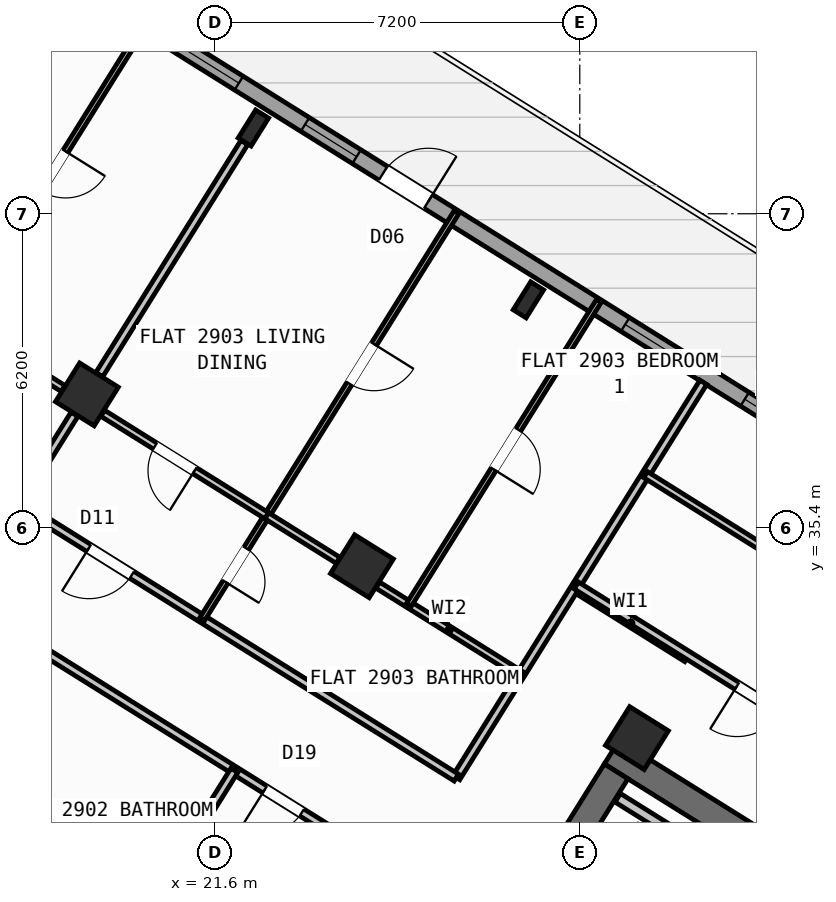
"""IFC4 building model, lengths in metres.
Left out: names, types, materials, properties, quantities, classifications, styles, units other than length and angle.
Written with IfcOpenShell. Run it as: python <this file> out.ifc"""

import sys

from ifc_helpers import new_model, si_unit, direction, frame, frame_2d, origin, origin_2d, place, context, subcontext, project, spatial, rectangle, hollow_rectangle, i_section, extrude, source, transform, mapped, element, fill, save


model = new_model("IFC4")
c1 = context("Model", 3, precision=1e-05, world=origin(), true_north=direction((0.0, 1.0)))
c2 = subcontext(c1, "Body", "Model", "MODEL_VIEW")
j1 = project(units=[si_unit("LENGTHUNIT", "METRE"), si_unit("PLANEANGLEUNIT", "RADIAN")], contexts=[c1])
p1 = place(None, origin())
s1 = spatial("IfcSite", under=j1, at=p1, CompositionType="ELEMENT")
p2 = place(p1, origin())
s2 = spatial("IfcBuilding", under=s1, at=p2, CompositionType="ELEMENT")
p3 = place(p2, frame((0.0, 0.0, 116.1)))
s3 = spatial("IfcBuildingStorey", under=s2, at=p3, CompositionType="ELEMENT", Elevation=116.1)
p4 = place(p3, frame((40.573, 24.01, 0.0), z_axis=(0.0, 0.0, 1.0), x_axis=(-0.848047359947, 0.529920442413, 0.0)))
e1 = element("IfcWall", 1, at=p4, inside=s3, PredefinedType="SHEAR", context=c2, shape_type="SweptSolid", body=[
    extrude(rectangle(XDim=13.14, YDim=0.55, at=frame_2d((6.57, 0.0))), origin(), (0.0, 0.0, 1.0), 3.35),
])
p5 = place(p3, frame((29.517, 30.594, 0.0), z_axis=(0.0, 0.0, 1.0), x_axis=(-0.529906864564, -0.848055844204, 0.0)))
e2 = element("IfcWall", 2, at=p5, inside=s3, PredefinedType="SHEAR", context=c2, shape_type="SweptSolid", body=[
    extrude(rectangle(XDim=3.575, YDim=0.55, at=frame_2d((1.788, 0.0))), origin(), (0.0, 0.0, 1.0), 3.35),
])
m1 = source(origin(), c2, "Body", "SweptSolid", [
    extrude(hollow_rectangle(XDim=0.9, YDim=0.9, WallThickness=0.036, at=origin_2d()), origin(), (0.0, 0.0, 1.0), 3.6),
])
p6 = place(p3, frame((29.928, 31.251, 0.0), z_axis=(0.0, 0.0, 1.0), x_axis=(-0.848048096156, 0.529919264233, 0.0)))
e3 = element("IfcColumn", 3, at=p6, inside=s3, PredefinedType="COLUMN", context=c2, shape_type="MappedRepresentation", body=[
    mapped(m1, transform((0.0, 0.0, 0.0), scale=1.0)),
])
m2 = source(origin(), c2, "Body", "SweptSolid", [
    extrude(i_section(OverallWidth=0.3, OverallDepth=0.65, WebThickness=0.016, FlangeThickness=0.031, at=origin_2d()), origin(), (0.0, 0.0, 1.0), 3.6),
])
p7 = place(p3, frame((27.786, 39.901, 0.0), z_axis=(0.0, 0.0, 1.0), x_axis=(-0.848048096156, 0.529919264233, 0.0)))
e4 = element("IfcColumn", 4, at=p7, inside=s3, PredefinedType="COLUMN", context=c2, shape_type="MappedRepresentation", body=[
    mapped(m2, transform((0.0, 0.0, 0.0), scale=1.0)),
])
p8 = place(p3, frame((24.5, 34.643, 0.0), z_axis=(0.0, 0.0, 1.0), x_axis=(-0.848048096156, 0.529919264233, 0.0)))
e5 = element("IfcColumn", 5, at=p8, inside=s3, PredefinedType="COLUMN", context=c2, shape_type="MappedRepresentation", body=[
    mapped(m1, transform((0.0, 0.0, 0.0), scale=1.0)),
])
p9 = place(p3, frame((22.358, 43.292, 0.0), z_axis=(0.0, 0.0, 1.0), x_axis=(-0.848048096156, 0.529919264233, 0.0)))
e6 = element("IfcColumn", 6, at=p9, inside=s3, PredefinedType="COLUMN", context=c2, shape_type="MappedRepresentation", body=[
    mapped(m2, transform((0.0, 0.0, 0.0), scale=1.0)),
])
p10 = place(p3, frame((19.073, 38.034, 0.0), z_axis=(0.0, 0.0, 1.0), x_axis=(-0.848048096156, 0.529919264233, 0.0)))
e7 = element("IfcColumn", 7, at=p10, inside=s3, PredefinedType="COLUMN", context=c2, shape_type="MappedRepresentation", body=[
    mapped(m1, transform((0.0, 0.0, 0.0), scale=1.0)),
])
p11 = place(p3, frame((17.424, 47.083, 0.0), z_axis=(0.0, 0.0, 1.0), x_axis=(0.848049927979, -0.529916332693, 0.0)))
e8 = element("IfcWall", 8, at=p11, inside=s3, PredefinedType="STANDARD", context=c2, shape_type="SweptSolid", body=[
    extrude(rectangle(XDim=29.223, YDim=0.32, at=frame_2d((14.612, 0.0))), origin(), (0.0, 0.0, 1.0), 3.35),
])
p12 = place(p11, frame((8.839, 0.0, 0.0)))
e9 = element("IfcOpeningElement", 9, at=p12, cuts=e8, PredefinedType="OPENING", context=c2, shape_type="SweptSolid", body=[
    extrude(rectangle(XDim=1.05, YDim=2.15, at=frame_2d((0.525, 1.075))), frame((0.0, 0.17, 0.0), z_axis=(0.0, -1.0, 0.0), x_axis=(1.0, 0.0, 0.0)), (0.0, 0.0, 1.0), 0.34),
])
p13 = place(p11, frame((0.719, 0.0, 0.85)))
e10 = element("IfcOpeningElement", 10, at=p13, cuts=e8, PredefinedType="OPENING", context=c2, shape_type="SweptSolid", body=[
    extrude(rectangle(XDim=1.8, YDim=1.5, at=frame_2d((0.9, 0.75))), frame((0.0, 0.17, 0.0), z_axis=(0.0, -1.0, 0.0), x_axis=(1.0, 0.0, 0.0)), (0.0, 0.0, 1.0), 0.34),
])
p14 = place(p11, frame((3.981, 0.0, 0.85)))
e11 = element("IfcOpeningElement", 11, at=p14, cuts=e8, PredefinedType="OPENING", context=c2, shape_type="SweptSolid", body=[
    extrude(rectangle(XDim=1.5, YDim=1.5, at=frame_2d((0.75, 0.75))), frame((0.0, 0.17, 0.0), z_axis=(0.0, -1.0, 0.0), x_axis=(1.0, 0.0, 0.0)), (0.0, 0.0, 1.0), 0.34),
])
p15 = place(p11, frame((7.021, 0.0, 0.95)))
e12 = element("IfcOpeningElement", 12, at=p15, cuts=e8, PredefinedType="OPENING", context=c2, shape_type="SweptSolid", body=[
    extrude(rectangle(XDim=1.2, YDim=1.4, at=frame_2d((0.6, 0.7))), frame((0.0, 0.17, 0.0), z_axis=(0.0, -1.0, 0.0), x_axis=(1.0, 0.0, 0.0)), (0.0, 0.0, 1.0), 0.34),
])
p16 = place(p11, frame((14.471, 0.0, 0.95)))
e13 = element("IfcOpeningElement", 13, at=p16, cuts=e8, PredefinedType="OPENING", context=c2, shape_type="SweptSolid", body=[
    extrude(rectangle(XDim=1.2, YDim=1.4, at=frame_2d((0.6, 0.7))), frame((0.0, 0.17, 0.0), z_axis=(0.0, -1.0, 0.0), x_axis=(1.0, 0.0, 0.0)), (0.0, 0.0, 1.0), 0.34),
])
p17 = place(p11, frame((17.254, 0.0, 1.0)))
e14 = element("IfcOpeningElement", 14, at=p17, cuts=e8, PredefinedType="OPENING", context=c2, shape_type="SweptSolid", body=[
    extrude(rectangle(XDim=0.9, YDim=1.25, at=frame_2d((0.45, 0.625))), frame((0.0, 0.17, 0.0), z_axis=(0.0, -1.0, 0.0), x_axis=(1.0, 0.0, 0.0)), (0.0, 0.0, 1.0), 0.34),
])
p18 = place(p11, frame((20.764, 0.0, 0.8)))
e15 = element("IfcOpeningElement", 15, at=p18, cuts=e8, PredefinedType="OPENING", context=c2, shape_type="SweptSolid", body=[
    extrude(rectangle(XDim=2.1, YDim=1.55, at=frame_2d((1.05, 0.775))), frame((0.0, 0.17, 0.0), z_axis=(0.0, -1.0, 0.0), x_axis=(1.0, 0.0, 0.0)), (0.0, 0.0, 1.0), 0.34),
])
p19 = place(p11, frame((25.403, 0.0, 0.8)))
e16 = element("IfcOpeningElement", 16, at=p19, cuts=e8, PredefinedType="OPENING", context=c2, shape_type="SweptSolid", body=[
    extrude(rectangle(XDim=2.1, YDim=1.55, at=frame_2d((1.05, 0.775))), frame((0.0, 0.17, 0.0), z_axis=(0.0, -1.0, 0.0), x_axis=(1.0, 0.0, 0.0)), (0.0, 0.0, 1.0), 0.34),
])
p20 = place(p3, frame((33.363, 27.69, 0.0), z_axis=(0.0, 0.0, 1.0), x_axis=(-0.848047090064, 0.529920874315, 0.0)))
e17 = element("IfcWall", 17, at=p20, inside=s3, PredefinedType="STANDARD", context=c2, shape_type="SweptSolid", body=[
    extrude(rectangle(XDim=4.498, YDim=0.2, at=frame_2d((2.249, 0.0))), origin(), (0.0, 0.0, 1.0), 3.34),
])
p21 = place(p3, frame((30.914, 32.829, 0.0), z_axis=(0.0, 0.0, 1.0), x_axis=(-0.848008813643, 0.529982124211, 0.0)))
e18 = element("IfcWall", 18, at=p21, inside=s3, PredefinedType="PARTITIONING", context=c2, shape_type="SweptSolid", body=[
    extrude(rectangle(XDim=2.61, YDim=0.16, at=frame_2d((1.305, 0.0))), origin(), (0.0, 0.0, 1.0), 3.34),
])
p22 = place(p3, frame((31.239, 38.274, 0.0), z_axis=(0.0, 0.0, 1.0), x_axis=(-0.529920220799, -0.848047498427, 0.0)))
e19 = element("IfcWall", 19, at=p22, inside=s3, PredefinedType="PARTITIONING", context=c2, shape_type="SweptSolid", body=[
    extrude(rectangle(XDim=9.2, YDim=0.16, at=frame_2d((4.6, 0.0))), origin(), (0.0, 0.0, 1.0), 3.34),
])
p23 = place(p3, frame((26.363, 30.472, 0.0), z_axis=(0.0, 0.0, 1.0), x_axis=(-0.848052408131, 0.529912363569, 0.0)))
e20 = element("IfcWall", 20, at=p23, inside=s3, PredefinedType="PARTITIONING", context=c2, shape_type="SweptSolid", body=[
    extrude(rectangle(XDim=16.73, YDim=0.16, at=frame_2d((8.365, 0.0))), origin(), (0.0, 0.0, 1.0), 3.34),
])
p24 = place(p23, frame((7.55, 0.0, 0.0)))
e21 = element("IfcOpeningElement", 21, at=p24, cuts=e20, PredefinedType="OPENING", context=c2, shape_type="SweptSolid", body=[
    extrude(rectangle(XDim=1.0, YDim=2.1, at=frame_2d((0.5, 1.05))), frame((0.0, 0.09, 0.0), z_axis=(0.0, -1.0, 0.0), x_axis=(1.0, 0.0, 0.0)), (0.0, 0.0, 1.0), 0.18),
])
p25 = place(p23, frame((11.14, 0.0, 0.0)))
e22 = element("IfcOpeningElement", 22, at=p25, cuts=e20, PredefinedType="OPENING", context=c2, shape_type="SweptSolid", body=[
    extrude(rectangle(XDim=1.0, YDim=2.1, at=frame_2d((0.5, 1.05))), frame((0.0, 0.09, 0.0), z_axis=(0.0, -1.0, 0.0), x_axis=(1.0, 0.0, 0.0)), (0.0, 0.0, 1.0), 0.18),
])
p26 = place(p3, frame((25.198, 28.606, 0.0), z_axis=(0.0, 0.0, 1.0), x_axis=(-0.848052408131, 0.529912363569, 0.0)))
e23 = element("IfcWall", 23, at=p26, inside=s3, PredefinedType="PARTITIONING", context=c2, shape_type="SweptSolid", body=[
    extrude(rectangle(XDim=16.73, YDim=0.16, at=frame_2d((8.365, 0.0))), origin(), (0.0, 0.0, 1.0), 3.34),
])
p27 = place(p26, frame((2.22, 0.0, 0.0)))
e24 = element("IfcOpeningElement", 24, at=p27, cuts=e23, PredefinedType="OPENING", context=c2, shape_type="SweptSolid", body=[
    extrude(rectangle(XDim=0.86, YDim=2.05, at=frame_2d((0.43, 1.025))), frame((0.0, 0.09, 0.0), z_axis=(0.0, -1.0, 0.0), x_axis=(1.0, 0.0, 0.0)), (0.0, 0.0, 1.0), 0.18),
])
p28 = place(p26, frame((12.084, 0.0, 0.0)))
e25 = element("IfcOpeningElement", 25, at=p28, cuts=e23, PredefinedType="OPENING", context=c2, shape_type="SweptSolid", body=[
    extrude(rectangle(XDim=1.0, YDim=2.1, at=frame_2d((0.5, 1.05))), frame((0.0, 0.09, 0.0), z_axis=(0.0, -1.0, 0.0), x_axis=(1.0, 0.0, 0.0)), (0.0, 0.0, 1.0), 0.18),
])
p29 = place(p3, frame((21.983, 30.615, 0.0), z_axis=(0.0, 0.0, 1.0), x_axis=(-0.529956894714, -0.848024580862, 0.0)))
e26 = element("IfcWall", 26, at=p29, inside=s3, PredefinedType="PARTITIONING", context=c2, shape_type="SweptSolid", body=[
    extrude(rectangle(XDim=2.088, YDim=0.16, at=frame_2d((1.044, 0.0))), origin(), (0.0, 0.0, 1.0), 2.775),
])
p30 = place(p3, frame((19.556, 26.73, 0.0), z_axis=(0.0, 0.0, 1.0), x_axis=(-0.848043949058, 0.52992590092, 0.0)))
e27 = element("IfcWall", 27, at=p30, inside=s3, PredefinedType="PLUMBINGWALL", context=c2, shape_type="SweptSolid", body=[
    extrude(rectangle(XDim=12.92, YDim=0.14, at=frame_2d((6.46, 0.0))), origin(), (0.0, 0.0, 1.0), 3.34),
])
p31 = place(p30, frame((5.849, 0.0, 0.0)))
e28 = element("IfcOpeningElement", 28, at=p31, cuts=e27, PredefinedType="OPENING", context=c2, shape_type="SweptSolid", body=[
    extrude(rectangle(XDim=0.92, YDim=2.08, at=frame_2d((0.46, 1.04))), frame((0.0, 0.08, 0.0), z_axis=(0.0, -1.0, 0.0), x_axis=(1.0, 0.0, 0.0)), (0.0, 0.0, 1.0), 0.16),
])
p32 = place(p3, frame((22.18, 43.006, 0.0), z_axis=(0.0, 0.0, 1.0), x_axis=(-0.529913610495, -0.848051628978, 0.0)))
e29 = element("IfcWall", 29, at=p32, inside=s3, PredefinedType="PARTITIONING", context=c2, shape_type="SweptSolid", body=[
    extrude(rectangle(XDim=5.401, YDim=0.16, at=frame_2d((2.7, 0.0))), origin(), (0.0, 0.0, 1.0), 2.775),
])
p33 = place(p3, frame((18.828, 37.643, 0.0), z_axis=(0.0, 0.0, 1.0), x_axis=(-0.529904345651, -0.848057418139, 0.0)))
e30 = element("IfcWall", 30, at=p33, inside=s3, PredefinedType="PARTITIONING", context=c2, shape_type="SweptSolid", body=[
    extrude(rectangle(XDim=2.088, YDim=0.16, at=frame_2d((1.044, 0.0))), origin(), (0.0, 0.0, 1.0), 2.775),
])
p34 = place(p3, frame((26.37, 41.635, 0.0), z_axis=(0.0, 0.0, 1.0), x_axis=(-0.529917830441, -0.848048992088, 0.0)))
e31 = element("IfcWall", 31, at=p34, inside=s3, PredefinedType="PARTITIONING", context=c2, shape_type="SweptSolid", body=[
    extrude(rectangle(XDim=9.47, YDim=0.11, at=frame_2d((4.735, 0.0))), origin(), (0.0, 0.0, 1.0), 2.995),
])
p35 = place(p34, frame((7.83, 0.0, 0.0)))
e32 = element("IfcOpeningElement", 32, at=p35, cuts=e31, PredefinedType="OPENING", context=c2, shape_type="SweptSolid", body=[
    extrude(rectangle(XDim=0.78, YDim=2.05, at=frame_2d((0.39, 1.025))), frame((0.0, 0.065, 0.0), z_axis=(0.0, -1.0, 0.0), x_axis=(1.0, 0.0, 0.0)), (0.0, 0.0, 1.0), 0.13),
])
p36 = place(p34, frame((3.075, 0.0, 0.0)))
e33 = element("IfcOpeningElement", 33, at=p36, cuts=e31, PredefinedType="OPENING", context=c2, shape_type="SweptSolid", body=[
    extrude(rectangle(XDim=0.92, YDim=2.08, at=frame_2d((0.46, 1.04))), frame((0.0, 0.065, 0.0), z_axis=(0.0, -1.0, 0.0), x_axis=(1.0, 0.0, 0.0)), (0.0, 0.0, 1.0), 0.13),
])
p37 = place(p3, frame((22.623, 35.639, 0.0), z_axis=(0.0, 0.0, 1.0), x_axis=(-0.8480485946, 0.529918466555, 0.0)))
e34 = element("IfcWall", 34, at=p37, inside=s3, PredefinedType="PLUMBINGWALL", context=c2, shape_type="SweptSolid", body=[
    extrude(rectangle(XDim=3.818, YDim=0.14, at=frame_2d((1.909, 0.0))), origin(), (0.0, 0.0, 1.0), 2.775),
])
p38 = place(p37, frame((1.68, 0.0, 0.0)))
e35 = element("IfcOpeningElement", 35, at=p38, cuts=e34, PredefinedType="OPENING", context=c2, shape_type="SweptSolid", body=[
    extrude(rectangle(XDim=0.92, YDim=2.08, at=frame_2d((0.46, 1.04))), frame((0.0, 0.08, 0.0), z_axis=(0.0, -1.0, 0.0), x_axis=(1.0, 0.0, 0.0)), (0.0, 0.0, 1.0), 0.16),
])
p39 = place(p3, frame((27.635, 32.507, 0.0), z_axis=(0.0, 0.0, 1.0), x_axis=(-0.848064240775, 0.529893426567, 0.0)))
e36 = element("IfcWall", 36, at=p39, inside=s3, PredefinedType="PLUMBINGWALL", context=c2, shape_type="SweptSolid", body=[
    extrude(rectangle(XDim=3.328, YDim=0.14, at=frame_2d((1.664, 0.0))), origin(), (0.0, 0.0, 1.0), 2.775),
])
p40 = place(p3, frame((24.029, 34.76, 0.0), z_axis=(0.0, 0.0, 1.0), x_axis=(-0.848023120795, 0.529959231071, 0.0)))
e37 = element("IfcWall", 37, at=p40, inside=s3, PredefinedType="PLUMBINGWALL", context=c2, shape_type="SweptSolid", body=[
    extrude(rectangle(XDim=1.658, YDim=0.14, at=frame_2d((0.829, 0.0))), origin(), (0.0, 0.0, 1.0), 2.775),
])
p41 = place(p3, frame((29.177, 39.881, 0.0), z_axis=(0.0, 0.0, 1.0), x_axis=(-0.529930649952, -0.848040981463, 0.0)))
e38 = element("IfcWall", 38, at=p41, inside=s3, PredefinedType="PARTITIONING", context=c2, shape_type="SweptSolid", body=[
    extrude(rectangle(XDim=7.07, YDim=0.11, at=frame_2d((3.535, 0.0))), origin(), (0.0, 0.0, 1.0), 3.34),
])
p42 = place(p41, frame((3.0, 0.0, 0.0)))
e39 = element("IfcOpeningElement", 39, at=p42, cuts=e38, PredefinedType="OPENING", context=c2, shape_type="SweptSolid", body=[
    extrude(rectangle(XDim=0.92, YDim=2.08, at=frame_2d((0.46, 1.04))), frame((0.0, 0.065, 0.0), z_axis=(0.0, -1.0, 0.0), x_axis=(1.0, 0.0, 0.0)), (0.0, 0.0, 1.0), 0.13),
])
p43 = place(p3, frame((20.281, 45.44, 0.0), z_axis=(0.0, 0.0, 1.0), x_axis=(-0.529917830441, -0.848048992088, 0.0)))
e40 = element("IfcWall", 40, at=p43, inside=s3, PredefinedType="PARTITIONING", context=c2, shape_type="SweptSolid", body=[
    extrude(rectangle(XDim=9.47, YDim=0.11, at=frame_2d((4.735, 0.0))), origin(), (0.0, 0.0, 1.0), 3.34),
])
p44 = place(p43, frame((7.83, 0.0, 0.0)))
e41 = element("IfcOpeningElement", 41, at=p44, cuts=e40, PredefinedType="OPENING", context=c2, shape_type="SweptSolid", body=[
    extrude(rectangle(XDim=0.78, YDim=2.05, at=frame_2d((0.39, 1.025))), frame((0.0, 0.065, 0.0), z_axis=(0.0, -1.0, 0.0), x_axis=(1.0, 0.0, 0.0)), (0.0, 0.0, 1.0), 0.13),
])
p45 = place(p43, frame((3.075, 0.0, 0.0)))
e42 = element("IfcOpeningElement", 42, at=p45, cuts=e40, PredefinedType="OPENING", context=c2, shape_type="SweptSolid", body=[
    extrude(rectangle(XDim=0.92, YDim=2.08, at=frame_2d((0.46, 1.04))), frame((0.0, 0.065, 0.0), z_axis=(0.0, -1.0, 0.0), x_axis=(1.0, 0.0, 0.0)), (0.0, 0.0, 1.0), 0.13),
])
p46 = place(p3, frame((18.602, 38.152, 0.0), z_axis=(0.0, 0.0, 1.0), x_axis=(-0.848020807548, 0.529962932634, 0.0)))
e43 = element("IfcWall", 43, at=p46, inside=s3, PredefinedType="PLUMBINGWALL", context=c2, shape_type="SweptSolid", body=[
    extrude(rectangle(XDim=2.438, YDim=0.14, at=frame_2d((1.219, 0.0))), origin(), (0.0, 0.0, 1.0), 2.775),
])
p47 = place(p46, frame((0.528, 0.0, 0.0)))
e44 = element("IfcOpeningElement", 44, at=p47, cuts=e43, PredefinedType="OPENING", context=c2, shape_type="SweptSolid", body=[
    extrude(rectangle(XDim=0.92, YDim=2.08, at=frame_2d((0.46, 1.04))), frame((0.0, 0.08, 0.0), z_axis=(0.0, -1.0, 0.0), x_axis=(1.0, 0.0, 0.0)), (0.0, 0.0, 1.0), 0.16),
])
p48 = place(p3, frame((41.936, 26.012, 0.0), z_axis=(0.0, 0.0, 1.0), x_axis=(-0.848051154596, 0.529914369676, 0.0)))
e45 = element("IfcWall", 45, at=p48, inside=s3, PredefinedType="PARTITIONING", context=c2, shape_type="SweptSolid", body=[
    extrude(rectangle(XDim=15.57, YDim=0.16, at=frame_2d((7.785, 0.0))), origin(), (0.0, 0.0, 1.0), 3.34),
])
p49 = place(p48, frame((10.83, 0.0, 0.0)))
e46 = element("IfcOpeningElement", 46, at=p49, cuts=e45, PredefinedType="OPENING", context=c2, shape_type="SweptSolid", body=[
    extrude(rectangle(XDim=1.0, YDim=2.1, at=frame_2d((0.5, 1.05))), frame((0.0, 0.09, 0.0), z_axis=(0.0, -1.0, 0.0), x_axis=(1.0, 0.0, 0.0)), (0.0, 0.0, 1.0), 0.18),
])
p50 = place(p3, frame((42.226, 28.873, 0.0), z_axis=(0.0, 0.0, 1.0), x_axis=(-0.848049134363, 0.529917602752, 0.0)))
e47 = element("IfcWall", 47, at=p50, inside=s3, PredefinedType="PLUMBINGWALL", context=c2, shape_type="SweptSolid", body=[
    extrude(rectangle(XDim=14.3, YDim=0.14, at=frame_2d((7.15, 0.0))), origin(), (0.0, 0.0, 1.0), 3.34),
])
p51 = place(p50, frame((9.57, 0.0, 0.0)))
e48 = element("IfcOpeningElement", 48, at=p51, cuts=e47, PredefinedType="OPENING", context=c2, shape_type="SweptSolid", body=[
    extrude(rectangle(XDim=0.92, YDim=2.08, at=frame_2d((0.46, 1.04))), frame((0.0, 0.08, 0.0), z_axis=(0.0, -1.0, 0.0), x_axis=(1.0, 0.0, 0.0)), (0.0, 0.0, 1.0), 0.16),
])
m3 = source(origin(), c2, "Body", "SweptSolid", [
    extrude(rectangle(XDim=1.05, YDim=2.15, at=frame_2d((0.525, 1.075))), frame((0.0, 0.025, 0.0), z_axis=(0.0, -1.0, 0.0), x_axis=(1.0, 0.0, 0.0)), (0.0, 0.0, 1.0), 0.05),
])
p52 = place(p12, origin())
e49 = element("IfcDoor", 49, at=p52, inside=s3, OperationType="SINGLE_SWING_RIGHT", PredefinedType="DOOR", context=c2, shape_type="MappedRepresentation", body=[
    mapped(m3, transform((0.0, 0.0, 0.0), scale=1.0)),
])
fill(e9, e49)
m4 = source(origin(), c2, "Body", "SweptSolid", [
    extrude(rectangle(XDim=1.5, YDim=1.5, at=frame_2d((0.75, 0.75))), frame((0.0, 0.03, 0.0), z_axis=(0.0, -1.0, 0.0), x_axis=(1.0, 0.0, 0.0)), (0.0, 0.0, 1.0), 0.06),
])
p53 = place(p14, origin())
e50 = element("IfcWindow", 50, at=p53, inside=s3, PartitioningType="SINGLE_PANEL", PredefinedType="WINDOW", context=c2, shape_type="MappedRepresentation", body=[
    mapped(m4, transform((0.0, 0.0, 0.0), scale=1.0)),
])
fill(e11, e50)
m5 = source(origin(), c2, "Body", "SweptSolid", [
    extrude(rectangle(XDim=1.2, YDim=1.4, at=frame_2d((0.6, 0.7))), frame((0.0, 0.03, 0.0), z_axis=(0.0, -1.0, 0.0), x_axis=(1.0, 0.0, 0.0)), (0.0, 0.0, 1.0), 0.06),
])
p54 = place(p15, origin())
e51 = element("IfcWindow", 51, at=p54, inside=s3, PartitioningType="SINGLE_PANEL", PredefinedType="WINDOW", context=c2, shape_type="MappedRepresentation", body=[
    mapped(m5, transform((0.0, 0.0, 0.0), scale=1.0)),
])
fill(e12, e51)
p55 = place(p16, origin())
e52 = element("IfcWindow", 52, at=p55, inside=s3, PartitioningType="SINGLE_PANEL", PredefinedType="WINDOW", context=c2, shape_type="MappedRepresentation", body=[
    mapped(m5, transform((0.0, 0.0, 0.0), scale=1.0)),
])
fill(e13, e52)
m6 = source(origin(), c2, "Body", "SweptSolid", [
    extrude(rectangle(XDim=0.9, YDim=1.25, at=frame_2d((0.45, 0.625))), frame((0.0, 0.03, 0.0), z_axis=(0.0, -1.0, 0.0), x_axis=(1.0, 0.0, 0.0)), (0.0, 0.0, 1.0), 0.06),
])
p56 = place(p17, origin())
e53 = element("IfcWindow", 53, at=p56, inside=s3, PartitioningType="SINGLE_PANEL", PredefinedType="WINDOW", context=c2, shape_type="MappedRepresentation", body=[
    mapped(m6, transform((0.0, 0.0, 0.0), scale=1.0)),
])
fill(e14, e53)
m7 = source(origin(), c2, "Body", "SweptSolid", [
    extrude(rectangle(XDim=0.86, YDim=2.05, at=frame_2d((0.43, 1.025))), frame((0.0, 0.025, 0.0), z_axis=(0.0, -1.0, 0.0), x_axis=(1.0, 0.0, 0.0)), (0.0, 0.0, 1.0), 0.05),
])
p57 = place(p27, origin())
e54 = element("IfcDoor", 54, at=p57, inside=s3, OperationType="SINGLE_SWING_RIGHT", PredefinedType="DOOR", context=c2, shape_type="MappedRepresentation", body=[
    mapped(m7, transform((0.0, 0.0, 0.0), scale=1.0)),
])
fill(e24, e54)
m8 = source(origin(), c2, "Body", "SweptSolid", [
    extrude(rectangle(XDim=1.0, YDim=2.1, at=frame_2d((0.5, 1.05))), frame((0.0, 0.025, 0.0), z_axis=(0.0, -1.0, 0.0), x_axis=(1.0, 0.0, 0.0)), (0.0, 0.0, 1.0), 0.05),
])
p58 = place(p24, origin())
e55 = element("IfcDoor", 55, at=p58, inside=s3, OperationType="SINGLE_SWING_RIGHT", PredefinedType="DOOR", context=c2, shape_type="MappedRepresentation", body=[
    mapped(m8, transform((0.0, 0.0, 0.0), scale=1.0)),
])
fill(e21, e55)
m9 = source(origin(), c2, "Body", "SweptSolid", [
    extrude(rectangle(XDim=0.92, YDim=2.08, at=frame_2d((0.46, 1.04))), frame((0.0, 0.025, 0.0), z_axis=(0.0, -1.0, 0.0), x_axis=(1.0, 0.0, 0.0)), (0.0, 0.0, 1.0), 0.05),
])
p59 = place(p38, origin())
e56 = element("IfcDoor", 56, at=p59, inside=s3, OperationType="SINGLE_SWING_LEFT", PredefinedType="DOOR", context=c2, shape_type="MappedRepresentation", body=[
    mapped(m9, transform((0.0, 0.0, 0.0), scale=1.0)),
])
fill(e35, e56)
m10 = source(origin(), c2, "Body", "SweptSolid", [
    extrude(rectangle(XDim=0.78, YDim=2.05, at=frame_2d((0.39, 1.025))), frame((0.0, 0.025, 0.0), z_axis=(0.0, -1.0, 0.0), x_axis=(1.0, 0.0, 0.0)), (0.0, 0.0, 1.0), 0.05),
])
p60 = place(p35, origin())
e57 = element("IfcDoor", 57, at=p60, inside=s3, OperationType="SINGLE_SWING_RIGHT", PredefinedType="DOOR", context=c2, shape_type="MappedRepresentation", body=[
    mapped(m10, transform((0.0, 0.0, 0.0), scale=1.0)),
])
fill(e32, e57)
p61 = place(p36, origin())
e58 = element("IfcDoor", 58, at=p61, inside=s3, OperationType="SINGLE_SWING_LEFT", PredefinedType="DOOR", context=c2, shape_type="MappedRepresentation", body=[
    mapped(m9, transform((0.0, 0.0, 0.0), scale=1.0)),
])
fill(e33, e58)
p62 = place(p42, origin())
e59 = element("IfcDoor", 59, at=p62, inside=s3, OperationType="SINGLE_SWING_RIGHT", PredefinedType="DOOR", context=c2, shape_type="MappedRepresentation", body=[
    mapped(m9, transform((0.0, 0.0, 0.0), scale=1.0)),
])
fill(e39, e59)
p63 = place(p45, origin())
e60 = element("IfcDoor", 60, at=p63, inside=s3, OperationType="SINGLE_SWING_LEFT", PredefinedType="DOOR", context=c2, shape_type="MappedRepresentation", body=[
    mapped(m9, transform((0.0, 0.0, 0.0), scale=1.0)),
])
fill(e42, e60)
p64 = place(p49, origin())
e61 = element("IfcDoor", 61, at=p64, inside=s3, OperationType="SINGLE_SWING_RIGHT", PredefinedType="DOOR", context=c2, shape_type="MappedRepresentation", body=[
    mapped(m8, transform((0.0, 0.0, 0.0), scale=1.0)),
])
fill(e46, e61)
save(model, sys.argv[1])
